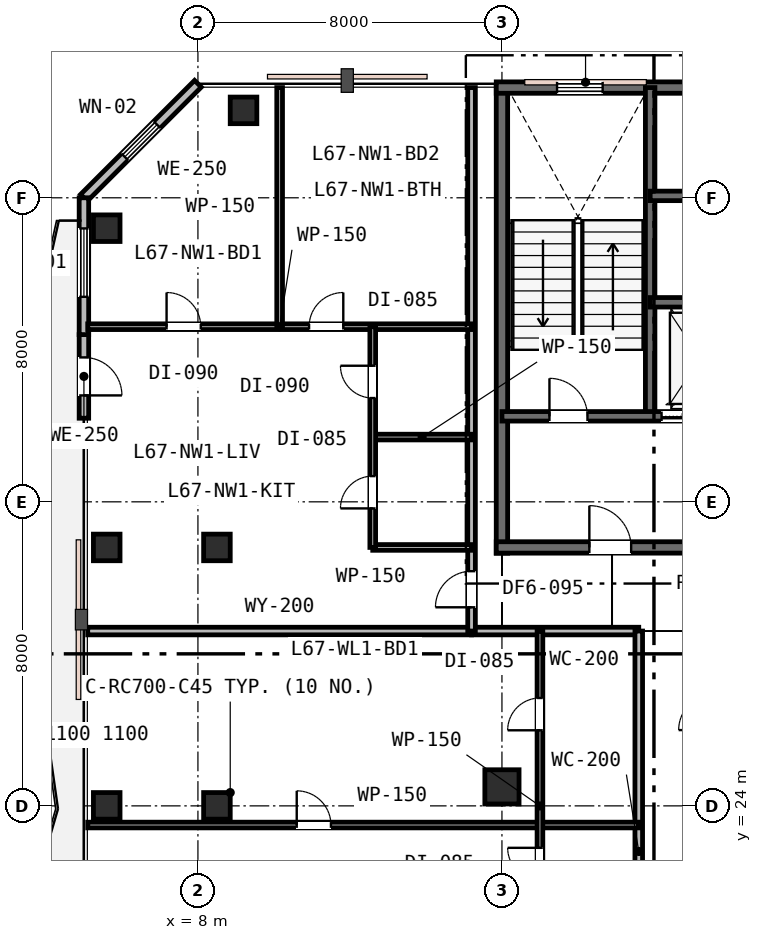
"""IFC4 building model, lengths in metres.
Left out: names, types, materials, properties, quantities, classifications, styles, units other than length and angle.
Written with IfcOpenShell. Run it as: python <this file> out.ifc"""

import sys

from ifc_helpers import new_model, si_unit, direction, frame, frame_2d, origin, origin_2d, place, context, subcontext, project, spatial, rectangle, extrude, element, fill, save


model = new_model("IFC4")
c1 = context("Model", 3, precision=1e-05, world=origin(), true_north=direction((0.0, 1.0)))
c2 = subcontext(c1, "Body", "Model", "MODEL_VIEW")
j1 = project(units=[si_unit("LENGTHUNIT", "METRE"), si_unit("PLANEANGLEUNIT", "RADIAN")], contexts=[c1])
p1 = place(None, origin())
s1 = spatial("IfcSite", under=j1, at=p1, CompositionType="ELEMENT")
p2 = place(p1, origin())
s2 = spatial("IfcBuilding", under=s1, at=p2, CompositionType="ELEMENT")
p3 = place(p2, frame((0.0, 0.0, 260.2)))
s3 = spatial("IfcBuildingStorey", under=s2, at=p3, CompositionType="ELEMENT", Elevation=260.2)
p4 = place(p3, frame((16.0, 30.65, 0.0), z_axis=(0.0, 0.0, 1.0), x_axis=(0.0, 1.0, 0.0)))
e1 = element("IfcWall", 1, at=p4, inside=s3, PredefinedType="SHEAR", context=c2, shape_type="SweptSolid", body=[
    extrude(rectangle(XDim=12.3, YDim=0.3, at=frame_2d((6.15, 0.0))), origin(), (0.0, 0.0, 1.0), 3.8),
])
p5 = place(p3, frame((15.85, 42.9, 0.0), z_axis=(0.0, 0.0, 1.0), x_axis=(1.0, 0.0, 0.0)))
e2 = element("IfcWall", 2, at=p5, inside=s3, PredefinedType="SHEAR", context=c2, shape_type="SweptSolid", body=[
    extrude(rectangle(XDim=24.3, YDim=0.3, at=frame_2d((12.15, 0.0))), origin(), (0.0, 0.0, 1.0), 3.8),
])
p6 = place(p5, frame((1.6, 0.0, 0.95)))
e3 = element("IfcOpeningElement", 3, at=p6, cuts=e2, PredefinedType="OPENING", context=c2, shape_type="SweptSolid", body=[
    extrude(rectangle(XDim=1.2, YDim=1.6, at=frame_2d((0.6, 0.8))), frame((0.0, 0.16, 0.0), z_axis=(0.0, -1.0, 0.0), x_axis=(1.0, 0.0, 0.0)), (0.0, 0.0, 1.0), 0.32),
])
p7 = place(p5, frame((16.5, 0.0, 0.95)))
e4 = element("IfcOpeningElement", 4, at=p7, cuts=e2, PredefinedType="OPENING", context=c2, shape_type="SweptSolid", body=[
    extrude(rectangle(XDim=1.2, YDim=1.6, at=frame_2d((0.6, 0.8))), frame((0.0, 0.16, 0.0), z_axis=(0.0, -1.0, 0.0), x_axis=(1.0, 0.0, 0.0)), (0.0, 0.0, 1.0), 0.32),
])
p8 = place(p5, frame((21.6, 0.0, 0.95)))
e5 = element("IfcOpeningElement", 5, at=p8, cuts=e2, PredefinedType="OPENING", context=c2, shape_type="SweptSolid", body=[
    extrude(rectangle(XDim=1.2, YDim=1.6, at=frame_2d((0.6, 0.8))), frame((0.0, 0.16, 0.0), z_axis=(0.0, -1.0, 0.0), x_axis=(1.0, 0.0, 0.0)), (0.0, 0.0, 1.0), 0.32),
])
p9 = place(p3, frame((15.85, 30.8, 0.0), z_axis=(0.0, 0.0, 1.0), x_axis=(1.0, 0.0, 0.0)))
e6 = element("IfcWall", 6, at=p9, inside=s3, PredefinedType="SHEAR", context=c2, shape_type="SweptSolid", body=[
    extrude(rectangle(XDim=11.2, YDim=0.3, at=frame_2d((5.6, 0.0))), origin(), (0.0, 0.0, 1.0), 3.8),
])
p10 = place(p9, frame((2.45, 0.0, 0.0)))
e7 = element("IfcOpeningElement", 7, at=p10, cuts=e6, PredefinedType="OPENING", context=c2, shape_type="SweptSolid", body=[
    extrude(rectangle(XDim=1.1, YDim=2.15, at=frame_2d((0.55, 1.075))), frame((0.0, 0.16, 0.0), z_axis=(0.0, -1.0, 0.0), x_axis=(1.0, 0.0, 0.0)), (0.0, 0.0, 1.0), 0.32),
])
p11 = place(p3, frame((19.9, 34.25, 0.0), z_axis=(0.0, 0.0, 1.0), x_axis=(0.0, 1.0, 0.0)))
e8 = element("IfcWall", 8, at=p11, inside=s3, PredefinedType="SHEAR", context=c2, shape_type="SweptSolid", body=[
    extrude(rectangle(XDim=8.65, YDim=0.25, at=frame_2d((4.325, 0.0))), origin(), (0.0, 0.0, 1.0), 3.8),
])
p12 = place(p3, frame((16.0, 34.25, 0.0), z_axis=(0.0, 0.0, 1.0), x_axis=(1.0, 0.0, 0.0)))
e9 = element("IfcWall", 9, at=p12, inside=s3, PredefinedType="SHEAR", context=c2, shape_type="SweptSolid", body=[
    extrude(rectangle(XDim=6.05, YDim=0.25, at=frame_2d((3.025, 0.0))), origin(), (0.0, 0.0, 1.0), 3.8),
])
p13 = place(p12, frame((1.25, 0.0, 0.0)))
e10 = element("IfcOpeningElement", 10, at=p13, cuts=e9, PredefinedType="OPENING", context=c2, shape_type="SweptSolid", body=[
    extrude(rectangle(XDim=1.0, YDim=2.15, at=frame_2d((0.5, 1.075))), frame((0.0, 0.135, 0.0), z_axis=(0.0, -1.0, 0.0), x_axis=(1.0, 0.0, 0.0)), (0.0, 0.0, 1.0), 0.27),
])
p14 = place(p12, frame((4.2, 0.0, 0.0)))
e11 = element("IfcOpeningElement", 11, at=p14, cuts=e9, PredefinedType="OPENING", context=c2, shape_type="SweptSolid", body=[
    extrude(rectangle(XDim=1.1, YDim=2.15, at=frame_2d((0.55, 1.075))), frame((0.0, 0.135, 0.0), z_axis=(0.0, -1.0, 0.0), x_axis=(1.0, 0.0, 0.0)), (0.0, 0.0, 1.0), 0.27),
])
p15 = place(p3, frame((19.9, 37.25, 0.0), z_axis=(0.0, 0.0, 1.0), x_axis=(1.0, 0.0, 0.0)))
e12 = element("IfcWall", 12, at=p15, inside=s3, PredefinedType="SHEAR", context=c2, shape_type="SweptSolid", body=[
    extrude(rectangle(XDim=16.2, YDim=0.25, at=frame_2d((8.1, 0.0))), origin(), (0.0, 0.0, 1.0), 3.8),
])
p16 = place(p15, frame((12.55, 0.0, 0.0)))
e13 = element("IfcOpeningElement", 13, at=p16, cuts=e12, PredefinedType="OPENING", context=c2, shape_type="SweptSolid", body=[
    extrude(rectangle(XDim=0.9, YDim=2.15, at=frame_2d((0.45, 1.075))), frame((0.0, 0.135, 0.0), z_axis=(0.0, -1.0, 0.0), x_axis=(1.0, 0.0, 0.0)), (0.0, 0.0, 1.0), 0.27),
])
p17 = place(p15, frame((2.5, 0.0, 0.0)))
e14 = element("IfcOpeningElement", 14, at=p17, cuts=e12, PredefinedType="OPENING", context=c2, shape_type="SweptSolid", body=[
    extrude(rectangle(XDim=1.05, YDim=2.15, at=frame_2d((0.525, 1.075))), frame((0.0, 0.135, 0.0), z_axis=(0.0, -1.0, 0.0), x_axis=(1.0, 0.0, 0.0)), (0.0, 0.0, 1.0), 0.27),
])
p18 = place(p15, frame((4.4, 0.0, 0.0)))
e15 = element("IfcOpeningElement", 15, at=p18, cuts=e12, PredefinedType="OPENING", context=c2, shape_type="SweptSolid", body=[
    extrude(rectangle(XDim=1.05, YDim=2.15, at=frame_2d((0.525, 1.075))), frame((0.0, 0.135, 0.0), z_axis=(0.0, -1.0, 0.0), x_axis=(1.0, 0.0, 0.0)), (0.0, 0.0, 1.0), 0.27),
])
p19 = place(p15, frame((6.3, 0.0, 0.0)))
e16 = element("IfcOpeningElement", 16, at=p19, cuts=e12, PredefinedType="OPENING", context=c2, shape_type="SweptSolid", body=[
    extrude(rectangle(XDim=1.05, YDim=2.15, at=frame_2d((0.525, 1.075))), frame((0.0, 0.135, 0.0), z_axis=(0.0, -1.0, 0.0), x_axis=(1.0, 0.0, 0.0)), (0.0, 0.0, 1.0), 0.27),
])
p20 = place(p3, frame((19.9, 40.05, 0.0), z_axis=(0.0, 0.0, 1.0), x_axis=(1.0, 0.0, 0.0)))
e17 = element("IfcWall", 17, at=p20, inside=s3, PredefinedType="SHEAR", context=c2, shape_type="SweptSolid", body=[
    extrude(rectangle(XDim=12.05, YDim=0.25, at=frame_2d((6.025, 0.0))), origin(), (0.0, 0.0, 1.0), 3.8),
])
p21 = place(p3, frame((8.5, 24.0, 0.0), z_axis=(0.0, 0.0, 1.0), x_axis=(1.0, 0.0, 0.0)))
e18 = element("IfcColumn", 18, at=p21, inside=s3, PredefinedType="COLUMN", context=c2, shape_type="SweptSolid", body=[
    extrude(rectangle(XDim=0.7, YDim=0.7, at=origin_2d()), origin(), (0.0, 0.0, 1.0), 3.8),
])
p22 = place(p3, frame((16.0, 24.5, 0.0), z_axis=(0.0, 0.0, 1.0), x_axis=(1.0, 0.0, 0.0)))
e19 = element("IfcColumn", 19, at=p22, inside=s3, PredefinedType="COLUMN", context=c2, shape_type="SweptSolid", body=[
    extrude(rectangle(XDim=0.9, YDim=0.9, at=origin_2d()), origin(), (0.0, 0.0, 1.0), 3.8),
])
for number, where, z_axis, x_axis in (
    (20, (5.6, 24.0, 0.0), (0.0, 0.0, 1.0), (1.0, 0.0, 0.0)),
    (21, (5.6, 30.8, 0.0), (0.0, 0.0, 1.0), (1.0, 0.0, 0.0)),
    (22, (5.6, 39.2, 0.0), (0.0, 0.0, 1.0), (1.0, 0.0, 0.0)),
    (23, (8.5, 30.8, 0.0), (0.0, 0.0, 1.0), (1.0, 0.0, 0.0)),
    (24, (9.2, 42.3, 0.0), (0.0, 0.0, 1.0), (1.0, 0.0, 0.0)),
):
    element("IfcColumn", number, at=place(p3, frame(where, z_axis=z_axis, x_axis=x_axis)), inside=s3, PredefinedType="COLUMN", context=c2, shape_type="SweptSolid", body=[
        extrude(rectangle(XDim=0.7, YDim=0.7, at=origin_2d()), origin(), (0.0, 0.0, 1.0), 3.8),
    ])
p23 = place(p3, frame((8.0, 43.0, 0.0), z_axis=(0.0, 0.0, 1.0), x_axis=(-0.707106781187, -0.707106781187, 0.0)))
e25 = element("IfcWall", 25, at=p23, inside=s3, PredefinedType="STANDARD", context=c2, shape_type="SweptSolid", body=[
    extrude(rectangle(XDim=4.243, YDim=0.25, at=frame_2d((2.121, 0.0))), origin(), (0.0, 0.0, 1.0), 3.53),
])
p24 = place(p23, frame((1.521, 0.0, 0.85)))
e26 = element("IfcOpeningElement", 26, at=p24, cuts=e25, PredefinedType="OPENING", context=c2, shape_type="SweptSolid", body=[
    extrude(rectangle(XDim=1.2, YDim=1.6, at=frame_2d((0.6, 0.8))), frame((0.0, 0.135, 0.0), z_axis=(0.0, -1.0, 0.0), x_axis=(1.0, 0.0, 0.0)), (0.0, 0.0, 1.0), 0.27),
])
p25 = place(p3, frame((5.0, 36.4, 0.0), z_axis=(0.0, 0.0, 1.0), x_axis=(0.0, -1.0, 0.0)))
e27 = element("IfcWall", 27, at=p25, inside=s3, PredefinedType="STANDARD", context=c2, shape_type="SweptSolid", body=[
    extrude(rectangle(XDim=2.2, YDim=0.25, at=frame_2d((1.1, 0.0))), origin(), (0.0, 0.0, 1.0), 3.53),
])
p26 = place(p25, frame((0.6, 0.0, 0.0)))
e28 = element("IfcOpeningElement", 28, at=p26, cuts=e27, PredefinedType="OPENING", context=c2, shape_type="SweptSolid", body=[
    extrude(rectangle(XDim=1.0, YDim=2.15, at=frame_2d((0.5, 1.075))), frame((0.0, 0.135, 0.0), z_axis=(0.0, -1.0, 0.0), x_axis=(1.0, 0.0, 0.0)), (0.0, 0.0, 1.0), 0.27),
])
p27 = place(p3, frame((5.0, 40.0, 0.0), z_axis=(0.0, 0.0, 1.0), x_axis=(0.0, -1.0, 0.0)))
e29 = element("IfcWall", 29, at=p27, inside=s3, PredefinedType="STANDARD", context=c2, shape_type="SweptSolid", body=[
    extrude(rectangle(XDim=3.6, YDim=0.25, at=frame_2d((1.8, 0.0))), origin(), (0.0, 0.0, 1.0), 3.53),
])
p28 = place(p27, frame((0.806, 0.0, 0.75)))
e30 = element("IfcOpeningElement", 30, at=p28, cuts=e29, PredefinedType="OPENING", context=c2, shape_type="SweptSolid", body=[
    extrude(rectangle(XDim=1.8, YDim=1.85, at=frame_2d((0.9, 0.925))), frame((0.0, 0.135, 0.0), z_axis=(0.0, -1.0, 0.0), x_axis=(1.0, 0.0, 0.0)), (0.0, 0.0, 1.0), 0.27),
])
p29 = place(p3, frame((5.1, 28.6, 0.0), z_axis=(0.0, 0.0, 1.0), x_axis=(1.0, 0.0, 0.0)))
e31 = element("IfcWall", 31, at=p29, inside=s3, PredefinedType="PARTITIONING", context=c2, shape_type="SweptSolid", body=[
    extrude(rectangle(XDim=10.1, YDim=0.2, at=frame_2d((5.05, 0.0))), origin(), (0.0, 0.0, 1.0), 3.53),
])
p30 = place(p3, frame((15.2, 28.6, 0.0), z_axis=(0.0, 0.0, 1.0), x_axis=(1.0, 0.0, 0.0)))
e32 = element("IfcWall", 32, at=p30, inside=s3, PredefinedType="PARTITIONING", context=c2, shape_type="SweptSolid", body=[
    extrude(rectangle(XDim=4.4, YDim=0.2, at=frame_2d((2.2, 0.0))), origin(), (0.0, 0.0, 1.0), 3.16),
])
p31 = place(p3, frame((15.2, 28.6, 0.0), z_axis=(0.0, 0.0, 1.0), x_axis=(0.0, 1.0, 0.0)))
e33 = element("IfcWall", 33, at=p31, inside=s3, PredefinedType="PARTITIONING", context=c2, shape_type="SweptSolid", body=[
    extrude(rectangle(XDim=14.3, YDim=0.2, at=frame_2d((7.15, 0.0))), origin(), (0.0, 0.0, 1.0), 3.53),
])
p32 = place(p31, frame((0.625, 0.0, 0.0)))
e34 = element("IfcOpeningElement", 34, at=p32, cuts=e33, PredefinedType="OPENING", context=c2, shape_type="SweptSolid", body=[
    extrude(rectangle(XDim=0.95, YDim=2.15, at=frame_2d((0.475, 1.075))), frame((0.0, 0.11, 0.0), z_axis=(0.0, -1.0, 0.0), x_axis=(1.0, 0.0, 0.0)), (0.0, 0.0, 1.0), 0.22),
])
for number, where, z_axis, x_axis in (
    (35, (12.6, 30.8, 0.0), (0.0, 0.0, 1.0), (1.0, 0.0, 0.0)),
    (36, (12.6, 33.704, 0.0), (0.0, 0.0, 1.0), (1.0, 0.0, 0.0)),
):
    element("IfcWall", number, at=place(p3, frame(where, z_axis=z_axis, x_axis=x_axis)), inside=s3, PredefinedType="PARTITIONING", context=c2, shape_type="SweptSolid", body=[
        extrude(rectangle(XDim=2.6, YDim=0.15, at=frame_2d((1.3, 0.0))), origin(), (0.0, 0.0, 1.0), 3.53),
    ])
p33 = place(p3, frame((5.1, 36.608, 0.0), z_axis=(0.0, 0.0, 1.0), x_axis=(1.0, 0.0, 0.0)))
e37 = element("IfcWall", 37, at=p33, inside=s3, PredefinedType="PARTITIONING", context=c2, shape_type="SweptSolid", body=[
    extrude(rectangle(XDim=10.1, YDim=0.15, at=frame_2d((5.05, 0.0))), origin(), (0.0, 0.0, 1.0), 3.53),
])
p34 = place(p33, frame((2.075, 0.0, 0.0)))
e38 = element("IfcOpeningElement", 38, at=p34, cuts=e37, PredefinedType="OPENING", context=c2, shape_type="SweptSolid", body=[
    extrude(rectangle(XDim=0.9, YDim=2.15, at=frame_2d((0.45, 1.075))), frame((0.0, 0.085, 0.0), z_axis=(0.0, -1.0, 0.0), x_axis=(1.0, 0.0, 0.0)), (0.0, 0.0, 1.0), 0.17),
])
p35 = place(p33, frame((5.825, 0.0, 0.0)))
e39 = element("IfcOpeningElement", 39, at=p35, cuts=e37, PredefinedType="OPENING", context=c2, shape_type="SweptSolid", body=[
    extrude(rectangle(XDim=0.9, YDim=2.15, at=frame_2d((0.45, 1.075))), frame((0.0, 0.085, 0.0), z_axis=(0.0, -1.0, 0.0), x_axis=(1.0, 0.0, 0.0)), (0.0, 0.0, 1.0), 0.17),
])
p36 = place(p3, frame((12.6, 30.8, 0.0), z_axis=(0.0, 0.0, 1.0), x_axis=(0.0, 1.0, 0.0)))
e40 = element("IfcWall", 40, at=p36, inside=s3, PredefinedType="PARTITIONING", context=c2, shape_type="SweptSolid", body=[
    extrude(rectangle(XDim=5.808, YDim=0.15, at=frame_2d((2.904, 0.0))), origin(), (0.0, 0.0, 1.0), 3.53),
])
p37 = place(p36, frame((1.027, 0.0, 0.0)))
e41 = element("IfcOpeningElement", 41, at=p37, cuts=e40, PredefinedType="OPENING", context=c2, shape_type="SweptSolid", body=[
    extrude(rectangle(XDim=0.85, YDim=2.15, at=frame_2d((0.425, 1.075))), frame((0.0, 0.085, 0.0), z_axis=(0.0, -1.0, 0.0), x_axis=(1.0, 0.0, 0.0)), (0.0, 0.0, 1.0), 0.17),
])
p38 = place(p36, frame((3.931, 0.0, 0.0)))
e42 = element("IfcOpeningElement", 42, at=p38, cuts=e40, PredefinedType="OPENING", context=c2, shape_type="SweptSolid", body=[
    extrude(rectangle(XDim=0.85, YDim=2.15, at=frame_2d((0.425, 1.075))), frame((0.0, 0.085, 0.0), z_axis=(0.0, -1.0, 0.0), x_axis=(1.0, 0.0, 0.0)), (0.0, 0.0, 1.0), 0.17),
])
p39 = place(p3, frame((10.15, 36.608, 0.0), z_axis=(0.0, 0.0, 1.0), x_axis=(0.0, 1.0, 0.0)))
e43 = element("IfcWall", 43, at=p39, inside=s3, PredefinedType="PARTITIONING", context=c2, shape_type="SweptSolid", body=[
    extrude(rectangle(XDim=6.292, YDim=0.15, at=frame_2d((3.146, 0.0))), origin(), (0.0, 0.0, 1.0), 3.53),
])
p40 = place(p3, frame((19.6, 17.0, 0.0), z_axis=(0.0, 0.0, 1.0), x_axis=(0.0, 1.0, 0.0)))
e44 = element("IfcWall", 44, at=p40, inside=s3, PredefinedType="PARTITIONING", context=c2, shape_type="SweptSolid", body=[
    extrude(rectangle(XDim=11.6, YDim=0.2, at=frame_2d((5.8, 0.0))), origin(), (0.0, 0.0, 1.0), 3.16),
])
p41 = place(p40, frame((0.723, 0.0, 0.0)))
e45 = element("IfcOpeningElement", 45, at=p41, cuts=e44, PredefinedType="OPENING", context=c2, shape_type="SweptSolid", body=[
    extrude(rectangle(XDim=0.95, YDim=2.15, at=frame_2d((0.475, 1.075))), frame((0.0, 0.11, 0.0), z_axis=(0.0, -1.0, 0.0), x_axis=(1.0, 0.0, 0.0)), (0.0, 0.0, 1.0), 0.22),
])
p42 = place(p3, frame((5.1, 23.496, 0.0), z_axis=(0.0, 0.0, 1.0), x_axis=(1.0, 0.0, 0.0)))
e46 = element("IfcWall", 46, at=p42, inside=s3, PredefinedType="PARTITIONING", context=c2, shape_type="SweptSolid", body=[
    extrude(rectangle(XDim=14.5, YDim=0.15, at=frame_2d((7.25, 0.0))), origin(), (0.0, 0.0, 1.0), 3.16),
])
p43 = place(p42, frame((5.5, 0.0, 0.0)))
e47 = element("IfcOpeningElement", 47, at=p43, cuts=e46, PredefinedType="OPENING", context=c2, shape_type="SweptSolid", body=[
    extrude(rectangle(XDim=0.9, YDim=2.15, at=frame_2d((0.45, 1.075))), frame((0.0, 0.085, 0.0), z_axis=(0.0, -1.0, 0.0), x_axis=(1.0, 0.0, 0.0)), (0.0, 0.0, 1.0), 0.17),
])
p44 = place(p3, frame((17.0, 19.396, 0.0), z_axis=(0.0, 0.0, 1.0), x_axis=(0.0, 1.0, 0.0)))
e48 = element("IfcWall", 48, at=p44, inside=s3, PredefinedType="PARTITIONING", context=c2, shape_type="SweptSolid", body=[
    extrude(rectangle(XDim=9.204, YDim=0.15, at=frame_2d((4.602, 0.0))), origin(), (0.0, 0.0, 1.0), 3.16),
])
p45 = place(p44, frame((0.6, 0.0, 0.0)))
e49 = element("IfcOpeningElement", 49, at=p45, cuts=e48, PredefinedType="OPENING", context=c2, shape_type="SweptSolid", body=[
    extrude(rectangle(XDim=0.85, YDim=2.15, at=frame_2d((0.425, 1.075))), frame((0.0, 0.085, 0.0), z_axis=(0.0, -1.0, 0.0), x_axis=(1.0, 0.0, 0.0)), (0.0, 0.0, 1.0), 0.17),
])
p46 = place(p44, frame((2.65, 0.0, 0.0)))
e50 = element("IfcOpeningElement", 50, at=p46, cuts=e48, PredefinedType="OPENING", context=c2, shape_type="SweptSolid", body=[
    extrude(rectangle(XDim=0.85, YDim=2.15, at=frame_2d((0.425, 1.075))), frame((0.0, 0.085, 0.0), z_axis=(0.0, -1.0, 0.0), x_axis=(1.0, 0.0, 0.0)), (0.0, 0.0, 1.0), 0.17),
])
p47 = place(p44, frame((6.593, 0.0, 0.0)))
e51 = element("IfcOpeningElement", 51, at=p47, cuts=e48, PredefinedType="OPENING", context=c2, shape_type="SweptSolid", body=[
    extrude(rectangle(XDim=0.85, YDim=2.15, at=frame_2d((0.425, 1.075))), frame((0.0, 0.085, 0.0), z_axis=(0.0, -1.0, 0.0), x_axis=(1.0, 0.0, 0.0)), (0.0, 0.0, 1.0), 0.17),
])
p48 = place(p6, origin())
e52 = element("IfcWindow", 52, at=p48, inside=s3, PartitioningType="SINGLE_PANEL", PredefinedType="WINDOW", context=c2, shape_type="SweptSolid", body=[
    extrude(rectangle(XDim=1.2, YDim=1.6, at=frame_2d((0.6, 0.8))), frame((0.0, 0.03, 0.0), z_axis=(0.0, -1.0, 0.0), x_axis=(1.0, 0.0, 0.0)), (0.0, 0.0, 1.0), 0.06),
])
fill(e3, e52)
p49 = place(p24, origin())
e53 = element("IfcWindow", 53, at=p49, inside=s3, PartitioningType="SINGLE_PANEL", PredefinedType="WINDOW", context=c2, shape_type="SweptSolid", body=[
    extrude(rectangle(XDim=1.2, YDim=1.6, at=frame_2d((0.6, 0.8))), frame((0.0, 0.03, 0.0), z_axis=(0.0, -1.0, 0.0), x_axis=(1.0, 0.0, 0.0)), (0.0, 0.0, 1.0), 0.06),
])
fill(e26, e53)
p50 = place(p26, origin())
e54 = element("IfcDoor", 54, at=p50, inside=s3, OperationType="SINGLE_SWING_RIGHT", PredefinedType="DOOR", context=c2, shape_type="SweptSolid", body=[
    extrude(rectangle(XDim=1.0, YDim=2.15, at=frame_2d((0.5, 1.075))), frame((0.0, 0.025, 0.0), z_axis=(0.0, -1.0, 0.0), x_axis=(1.0, 0.0, 0.0)), (0.0, 0.0, 1.0), 0.05),
])
fill(e28, e54)
p51 = place(p28, origin())
e55 = element("IfcWindow", 55, at=p51, inside=s3, PartitioningType="SINGLE_PANEL", PredefinedType="WINDOW", context=c2, shape_type="SweptSolid", body=[
    extrude(rectangle(XDim=1.8, YDim=1.85, at=frame_2d((0.9, 0.925))), frame((0.0, 0.03, 0.0), z_axis=(0.0, -1.0, 0.0), x_axis=(1.0, 0.0, 0.0)), (0.0, 0.0, 1.0), 0.06),
])
fill(e30, e55)
p52 = place(p13, origin())
e56 = element("IfcDoor", 56, at=p52, inside=s3, OperationType="SINGLE_SWING_LEFT", PredefinedType="DOOR", context=c2, shape_type="SweptSolid", body=[
    extrude(rectangle(XDim=1.0, YDim=2.15, at=frame_2d((0.5, 1.075))), frame((0.0, 0.025, 0.0), z_axis=(0.0, -1.0, 0.0), x_axis=(1.0, 0.0, 0.0)), (0.0, 0.0, 1.0), 0.05),
])
fill(e10, e56)
p53 = place(p10, origin())
e57 = element("IfcDoor", 57, at=p53, inside=s3, OperationType="SINGLE_SWING_LEFT", PredefinedType="DOOR", context=c2, shape_type="SweptSolid", body=[
    extrude(rectangle(XDim=1.1, YDim=2.15, at=frame_2d((0.55, 1.075))), frame((0.0, 0.025, 0.0), z_axis=(0.0, -1.0, 0.0), x_axis=(1.0, 0.0, 0.0)), (0.0, 0.0, 1.0), 0.05),
])
fill(e7, e57)
p54 = place(p32, origin())
e58 = element("IfcDoor", 58, at=p54, inside=s3, OperationType="SINGLE_SWING_LEFT", PredefinedType="DOOR", context=c2, shape_type="SweptSolid", body=[
    extrude(rectangle(XDim=0.95, YDim=2.15, at=frame_2d((0.475, 1.075))), frame((0.0, 0.025, 0.0), z_axis=(0.0, -1.0, 0.0), x_axis=(1.0, 0.0, 0.0)), (0.0, 0.0, 1.0), 0.05),
])
fill(e34, e58)
p55 = place(p37, origin())
e59 = element("IfcDoor", 59, at=p55, inside=s3, OperationType="SINGLE_SWING_LEFT", PredefinedType="DOOR", context=c2, shape_type="SweptSolid", body=[
    extrude(rectangle(XDim=0.85, YDim=2.15, at=frame_2d((0.425, 1.075))), frame((0.0, 0.025, 0.0), z_axis=(0.0, -1.0, 0.0), x_axis=(1.0, 0.0, 0.0)), (0.0, 0.0, 1.0), 0.05),
])
fill(e41, e59)
p56 = place(p38, origin())
e60 = element("IfcDoor", 60, at=p56, inside=s3, OperationType="SINGLE_SWING_RIGHT", PredefinedType="DOOR", context=c2, shape_type="SweptSolid", body=[
    extrude(rectangle(XDim=0.85, YDim=2.15, at=frame_2d((0.425, 1.075))), frame((0.0, 0.025, 0.0), z_axis=(0.0, -1.0, 0.0), x_axis=(1.0, 0.0, 0.0)), (0.0, 0.0, 1.0), 0.05),
])
fill(e42, e60)
p57 = place(p34, origin())
e61 = element("IfcDoor", 61, at=p57, inside=s3, OperationType="SINGLE_SWING_LEFT", PredefinedType="DOOR", context=c2, shape_type="SweptSolid", body=[
    extrude(rectangle(XDim=0.9, YDim=2.15, at=frame_2d((0.45, 1.075))), frame((0.0, 0.025, 0.0), z_axis=(0.0, -1.0, 0.0), x_axis=(1.0, 0.0, 0.0)), (0.0, 0.0, 1.0), 0.05),
])
fill(e38, e61)
p58 = place(p35, origin())
e62 = element("IfcDoor", 62, at=p58, inside=s3, OperationType="SINGLE_SWING_RIGHT", PredefinedType="DOOR", context=c2, shape_type="SweptSolid", body=[
    extrude(rectangle(XDim=0.9, YDim=2.15, at=frame_2d((0.45, 1.075))), frame((0.0, 0.025, 0.0), z_axis=(0.0, -1.0, 0.0), x_axis=(1.0, 0.0, 0.0)), (0.0, 0.0, 1.0), 0.05),
])
fill(e39, e62)
p59 = place(p46, origin())
e63 = element("IfcDoor", 63, at=p59, inside=s3, OperationType="SINGLE_SWING_RIGHT", PredefinedType="DOOR", context=c2, shape_type="SweptSolid", body=[
    extrude(rectangle(XDim=0.85, YDim=2.15, at=frame_2d((0.425, 1.075))), frame((0.0, 0.025, 0.0), z_axis=(0.0, -1.0, 0.0), x_axis=(1.0, 0.0, 0.0)), (0.0, 0.0, 1.0), 0.05),
])
fill(e50, e63)
p60 = place(p47, origin())
e64 = element("IfcDoor", 64, at=p60, inside=s3, OperationType="SINGLE_SWING_LEFT", PredefinedType="DOOR", context=c2, shape_type="SweptSolid", body=[
    extrude(rectangle(XDim=0.85, YDim=2.15, at=frame_2d((0.425, 1.075))), frame((0.0, 0.025, 0.0), z_axis=(0.0, -1.0, 0.0), x_axis=(1.0, 0.0, 0.0)), (0.0, 0.0, 1.0), 0.05),
])
fill(e51, e64)
p61 = place(p43, origin())
e65 = element("IfcDoor", 65, at=p61, inside=s3, OperationType="SINGLE_SWING_LEFT", PredefinedType="DOOR", context=c2, shape_type="SweptSolid", body=[
    extrude(rectangle(XDim=0.9, YDim=2.15, at=frame_2d((0.45, 1.075))), frame((0.0, 0.025, 0.0), z_axis=(0.0, -1.0, 0.0), x_axis=(1.0, 0.0, 0.0)), (0.0, 0.0, 1.0), 0.05),
])
fill(e47, e65)
p62 = place(p14, origin())
e66 = element("IfcDoor", 66, at=p62, inside=s3, OperationType="DOUBLE_DOOR_SLIDING", PredefinedType="DOOR", context=c2, shape_type="SweptSolid", body=[
    extrude(rectangle(XDim=1.1, YDim=2.15, at=frame_2d((0.55, 1.075))), frame((0.0, 0.025, 0.0), z_axis=(0.0, -1.0, 0.0), x_axis=(1.0, 0.0, 0.0)), (0.0, 0.0, 1.0), 0.05),
])
fill(e11, e66)
save(model, sys.argv[1])
